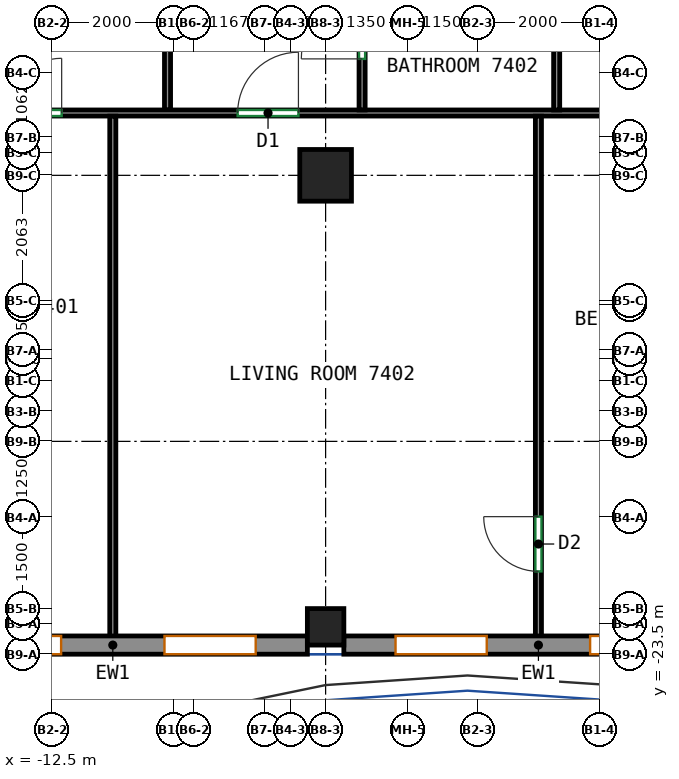
"""IFC4 building model, lengths in metres.
Left out: names, types, materials, properties, quantities, classifications, styles, units other than length and angle.
Written with IfcOpenShell. Run it as: python <this file> out.ifc"""

import sys

from ifc_helpers import new_model, si_unit, direction, frame, frame_2d, origin, origin_2d, place, context, subcontext, project, spatial, rectangle, extrude, source, transform, mapped, element, fill, save


model = new_model("IFC4")
c1 = context("Model", 3, precision=1e-05, world=origin(), true_north=direction((0.0, 1.0)))
c2 = subcontext(c1, "Body", "Model", "MODEL_VIEW")
j1 = project(units=[si_unit("LENGTHUNIT", "METRE"), si_unit("PLANEANGLEUNIT", "RADIAN")], contexts=[c1])
p1 = place(None, origin())
s1 = spatial("IfcSite", under=j1, at=p1, CompositionType="ELEMENT")
p2 = place(p1, origin())
s2 = spatial("IfcBuilding", under=s1, at=p2, CompositionType="ELEMENT")
p3 = place(p2, frame((0.0, 0.0, 298.4)))
s3 = spatial("IfcBuildingStorey", under=s2, at=p3, CompositionType="ELEMENT", Elevation=298.4)
m1 = source(origin(), c2, "Body", "SweptSolid", [
    extrude(rectangle(XDim=0.6, YDim=0.6, at=origin_2d()), origin(), (0.0, 0.0, 1.0), 3.12),
])
p4 = place(p3, frame((-8.0, -23.05, 0.0), z_axis=(0.0, 0.0, 1.0), x_axis=(1.0, 0.0, 0.0)))
e1 = element("IfcColumn", 1, at=p4, inside=s3, PredefinedType="COLUMN", context=c2, shape_type="MappedRepresentation", body=[
    mapped(m1, transform((0.0, 0.0, 0.0))),
])
m2 = source(origin(), c2, "Body", "SweptSolid", [
    extrude(rectangle(XDim=0.85, YDim=0.85, at=origin_2d()), origin(), (0.0, 0.0, 1.0), 3.12),
])
p5 = place(p3, frame((-8.0, -15.625, 0.0), z_axis=(0.0, 0.0, 1.0), x_axis=(1.0, 0.0, 0.0)))
e2 = element("IfcColumn", 2, at=p5, inside=s3, PredefinedType="COLUMN", context=c2, shape_type="MappedRepresentation", body=[
    mapped(m2, transform((0.0, 0.0, 0.0))),
])
m3 = source(origin(), c2, "Body", "SweptSolid", [
    extrude(rectangle(XDim=6.4, YDim=0.3, at=frame_2d((3.2, 0.0))), origin(), (0.0, 0.0, 1.0), 3.12),
])
p6 = place(p3, frame((-14.7, -23.35, 0.0), z_axis=(0.0, 0.0, 1.0), x_axis=(1.0, 0.0, 0.0)))
e3 = element("IfcWall", 3, at=p6, inside=s3, PredefinedType="SOLIDWALL", context=c2, shape_type="MappedRepresentation", body=[
    mapped(m3, transform((0.0, 0.0, 0.0))),
])
p7 = place(p6, frame((0.85, 0.0, 0.8)))
e4 = element("IfcOpeningElement", 4, at=p7, cuts=e3, PredefinedType="OPENING", context=c2, shape_type="SweptSolid", body=[
    extrude(rectangle(XDim=1.5, YDim=2.05, at=frame_2d((0.75, 1.025))), frame((0.0, 0.16, 0.0), z_axis=(0.0, -1.0, 0.0), x_axis=(1.0, 0.0, 0.0)), (0.0, 0.0, 1.0), 0.32),
])
p8 = place(p6, frame((4.05, 0.0, 0.8)))
e5 = element("IfcOpeningElement", 5, at=p8, cuts=e3, PredefinedType="OPENING", context=c2, shape_type="SweptSolid", body=[
    extrude(rectangle(XDim=1.5, YDim=2.05, at=frame_2d((0.75, 1.025))), frame((0.0, 0.16, 0.0), z_axis=(0.0, -1.0, 0.0), x_axis=(1.0, 0.0, 0.0)), (0.0, 0.0, 1.0), 0.32),
])
p9 = place(p3, frame((-7.7, -23.35, 0.0), z_axis=(0.0, 0.0, 1.0), x_axis=(1.0, 0.0, 0.0)))
e6 = element("IfcWall", 6, at=p9, inside=s3, PredefinedType="SOLIDWALL", context=c2, shape_type="MappedRepresentation", body=[
    mapped(m3, transform((0.0, 0.0, 0.0))),
])
p10 = place(p9, frame((0.85, 0.0, 0.8)))
e7 = element("IfcOpeningElement", 7, at=p10, cuts=e6, PredefinedType="OPENING", context=c2, shape_type="SweptSolid", body=[
    extrude(rectangle(XDim=1.5, YDim=2.05, at=frame_2d((0.75, 1.025))), frame((0.0, 0.16, 0.0), z_axis=(0.0, -1.0, 0.0), x_axis=(1.0, 0.0, 0.0)), (0.0, 0.0, 1.0), 0.32),
])
p11 = place(p9, frame((4.05, 0.0, 0.8)))
e8 = element("IfcOpeningElement", 8, at=p11, cuts=e6, PredefinedType="OPENING", context=c2, shape_type="SweptSolid", body=[
    extrude(rectangle(XDim=1.5, YDim=2.05, at=frame_2d((0.75, 1.025))), frame((0.0, 0.16, 0.0), z_axis=(0.0, -1.0, 0.0), x_axis=(1.0, 0.0, 0.0)), (0.0, 0.0, 1.0), 0.32),
])
p12 = place(p3, frame((-10.6, -14.55, 0.0), z_axis=(0.0, 0.0, 1.0), x_axis=(0.0, 1.0, 0.0)))
e9 = element("IfcWall", 9, at=p12, inside=s3, PredefinedType="PARTITIONING", context=c2, shape_type="SweptSolid", body=[
    extrude(rectangle(XDim=2.573, YDim=0.1, at=frame_2d((1.287, 0.0))), origin(), (0.0, 0.0, 1.0), 3.12),
])
p13 = place(p12, frame((1.373, 0.0, 0.0)))
e10 = element("IfcOpeningElement", 10, at=p13, cuts=e9, PredefinedType="OPENING", context=c2, shape_type="SweptSolid", body=[
    extrude(rectangle(XDim=1.0, YDim=2.1, at=frame_2d((0.5, 1.05))), frame((0.0, 0.06, 0.0), z_axis=(0.0, -1.0, 0.0), x_axis=(1.0, 0.0, 0.0)), (0.0, 0.0, 1.0), 0.12),
])
p14 = place(p3, frame((-13.55, -14.6, 0.0), z_axis=(0.0, 0.0, 1.0), x_axis=(1.0, 0.0, 0.0)))
e11 = element("IfcWall", 11, at=p14, inside=s3, PredefinedType="PARTITIONING", context=c2, shape_type="SweptSolid", body=[
    extrude(rectangle(XDim=31.3, YDim=0.1, at=frame_2d((15.65, 0.0))), origin(), (0.0, 0.0, 1.0), 3.12),
])
p15 = place(p14, frame((0.309, 0.0, 0.0)))
e12 = element("IfcOpeningElement", 12, at=p15, cuts=e11, PredefinedType="OPENING", context=c2, shape_type="SweptSolid", body=[
    extrude(rectangle(XDim=0.9, YDim=2.1, at=frame_2d((0.45, 1.05))), frame((0.0, 0.06, 0.0), z_axis=(0.0, -1.0, 0.0), x_axis=(1.0, 0.0, 0.0)), (0.0, 0.0, 1.0), 0.12),
])
p16 = place(p14, frame((4.103, 0.0, 0.0)))
e13 = element("IfcOpeningElement", 13, at=p16, cuts=e11, PredefinedType="OPENING", context=c2, shape_type="SweptSolid", body=[
    extrude(rectangle(XDim=1.0, YDim=2.1, at=frame_2d((0.5, 1.05))), frame((0.0, 0.06, 0.0), z_axis=(0.0, -1.0, 0.0), x_axis=(1.0, 0.0, 0.0)), (0.0, 0.0, 1.0), 0.12),
])
p17 = place(p14, frame((13.955, 0.0, 0.0)))
e14 = element("IfcOpeningElement", 14, at=p17, cuts=e11, PredefinedType="OPENING", context=c2, shape_type="SweptSolid", body=[
    extrude(rectangle(XDim=0.9, YDim=2.1, at=frame_2d((0.45, 1.05))), frame((0.0, 0.06, 0.0), z_axis=(0.0, -1.0, 0.0), x_axis=(1.0, 0.0, 0.0)), (0.0, 0.0, 1.0), 0.12),
])
p18 = place(p14, frame((17.453, 0.0, 0.0)))
e15 = element("IfcOpeningElement", 15, at=p18, cuts=e11, PredefinedType="OPENING", context=c2, shape_type="SweptSolid", body=[
    extrude(rectangle(XDim=1.0, YDim=2.1, at=frame_2d((0.5, 1.05))), frame((0.0, 0.06, 0.0), z_axis=(0.0, -1.0, 0.0), x_axis=(1.0, 0.0, 0.0)), (0.0, 0.0, 1.0), 0.12),
])
p19 = place(p14, frame((23.13, 0.0, 0.0)))
e16 = element("IfcOpeningElement", 16, at=p19, cuts=e11, PredefinedType="OPENING", context=c2, shape_type="SweptSolid", body=[
    extrude(rectangle(XDim=1.0, YDim=2.1, at=frame_2d((0.5, 1.05))), frame((0.0, 0.06, 0.0), z_axis=(0.0, -1.0, 0.0), x_axis=(1.0, 0.0, 0.0)), (0.0, 0.0, 1.0), 0.12),
])
p20 = place(p3, frame((-7.4, -14.55, 0.0), z_axis=(0.0, 0.0, 1.0), x_axis=(0.0, 1.0, 0.0)))
e17 = element("IfcWall", 17, at=p20, inside=s3, PredefinedType="PARTITIONING", context=c2, shape_type="SweptSolid", body=[
    extrude(rectangle(XDim=2.573, YDim=0.1, at=frame_2d((1.287, 0.0))), origin(), (0.0, 0.0, 1.0), 3.12),
])
p21 = place(p20, frame((0.84, 0.0, 0.0)))
e18 = element("IfcOpeningElement", 18, at=p21, cuts=e17, PredefinedType="OPENING", context=c2, shape_type="SweptSolid", body=[
    extrude(rectangle(XDim=1.0, YDim=2.1, at=frame_2d((0.5, 1.05))), frame((0.0, 0.06, 0.0), z_axis=(0.0, -1.0, 0.0), x_axis=(1.0, 0.0, 0.0)), (0.0, 0.0, 1.0), 0.12),
])
p22 = place(p3, frame((-4.2, -14.55, 0.0), z_axis=(0.0, 0.0, 1.0), x_axis=(0.0, 1.0, 0.0)))
e19 = element("IfcWall", 19, at=p22, inside=s3, PredefinedType="PARTITIONING", context=c2, shape_type="SweptSolid", body=[
    extrude(rectangle(XDim=2.573, YDim=0.1, at=frame_2d((1.287, 0.0))), origin(), (0.0, 0.0, 1.0), 3.12),
])
p23 = place(p22, frame((1.261, 0.0, 0.0)))
e20 = element("IfcOpeningElement", 20, at=p23, cuts=e19, PredefinedType="OPENING", context=c2, shape_type="SweptSolid", body=[
    extrude(rectangle(XDim=0.9, YDim=2.1, at=frame_2d((0.45, 1.05))), frame((0.0, 0.06, 0.0), z_axis=(0.0, -1.0, 0.0), x_axis=(1.0, 0.0, 0.0)), (0.0, 0.0, 1.0), 0.12),
])
p24 = place(p3, frame((-11.5, -23.25, 0.0), z_axis=(0.0, 0.0, 1.0), x_axis=(0.0, 1.0, 0.0)))
e21 = element("IfcWall", 21, at=p24, inside=s3, PredefinedType="PARTITIONING", context=c2, shape_type="SweptSolid", body=[
    extrude(rectangle(XDim=8.598, YDim=0.1, at=frame_2d((4.299, 0.0))), origin(), (0.0, 0.0, 1.0), 3.12),
])
p25 = place(p3, frame((-4.5, -23.25, 0.0), z_axis=(0.0, 0.0, 1.0), x_axis=(0.0, 1.0, 0.0)))
e22 = element("IfcWall", 22, at=p25, inside=s3, PredefinedType="PARTITIONING", context=c2, shape_type="SweptSolid", body=[
    extrude(rectangle(XDim=8.598, YDim=0.1, at=frame_2d((4.299, 0.0))), origin(), (0.0, 0.0, 1.0), 3.12),
])
p26 = place(p25, frame((1.112, 0.0, 0.0)))
e23 = element("IfcOpeningElement", 23, at=p26, cuts=e22, PredefinedType="OPENING", context=c2, shape_type="SweptSolid", body=[
    extrude(rectangle(XDim=0.9, YDim=2.1, at=frame_2d((0.45, 1.05))), frame((0.0, 0.06, 0.0), z_axis=(0.0, -1.0, 0.0), x_axis=(1.0, 0.0, 0.0)), (0.0, 0.0, 1.0), 0.12),
])
p27 = place(p7, origin())
e24 = element("IfcWindow", 24, at=p27, inside=s3, PartitioningType="SINGLE_PANEL", PredefinedType="WINDOW", context=c2, shape_type="SweptSolid", body=[
    extrude(rectangle(XDim=1.5, YDim=2.05, at=frame_2d((0.75, 1.025))), frame((0.0, 0.03, 0.0), z_axis=(0.0, -1.0, 0.0), x_axis=(1.0, 0.0, 0.0)), (0.0, 0.0, 1.0), 0.06),
])
fill(e4, e24)
p28 = place(p8, origin())
e25 = element("IfcWindow", 25, at=p28, inside=s3, PartitioningType="SINGLE_PANEL", PredefinedType="WINDOW", context=c2, shape_type="SweptSolid", body=[
    extrude(rectangle(XDim=1.5, YDim=2.05, at=frame_2d((0.75, 1.025))), frame((0.0, 0.03, 0.0), z_axis=(0.0, -1.0, 0.0), x_axis=(1.0, 0.0, 0.0)), (0.0, 0.0, 1.0), 0.06),
])
fill(e5, e25)
p29 = place(p10, origin())
e26 = element("IfcWindow", 26, at=p29, inside=s3, PartitioningType="SINGLE_PANEL", PredefinedType="WINDOW", context=c2, shape_type="SweptSolid", body=[
    extrude(rectangle(XDim=1.5, YDim=2.05, at=frame_2d((0.75, 1.025))), frame((0.0, 0.03, 0.0), z_axis=(0.0, -1.0, 0.0), x_axis=(1.0, 0.0, 0.0)), (0.0, 0.0, 1.0), 0.06),
])
fill(e7, e26)
p30 = place(p11, origin())
e27 = element("IfcWindow", 27, at=p30, inside=s3, PartitioningType="SINGLE_PANEL", PredefinedType="WINDOW", context=c2, shape_type="SweptSolid", body=[
    extrude(rectangle(XDim=1.5, YDim=2.05, at=frame_2d((0.75, 1.025))), frame((0.0, 0.03, 0.0), z_axis=(0.0, -1.0, 0.0), x_axis=(1.0, 0.0, 0.0)), (0.0, 0.0, 1.0), 0.06),
])
fill(e8, e27)
p31 = place(p26, origin())
e28 = element("IfcDoor", 28, at=p31, inside=s3, OperationType="SINGLE_SWING_RIGHT", PredefinedType="DOOR", context=c2, shape_type="SweptSolid", body=[
    extrude(rectangle(XDim=0.9, YDim=2.1, at=frame_2d((0.45, 1.05))), frame((0.0, 0.025, 0.0), z_axis=(0.0, -1.0, 0.0), x_axis=(1.0, 0.0, 0.0)), (0.0, 0.0, 1.0), 0.05),
])
fill(e23, e28)
p32 = place(p15, origin())
e29 = element("IfcDoor", 29, at=p32, inside=s3, OperationType="SINGLE_SWING_RIGHT", PredefinedType="DOOR", context=c2, shape_type="SweptSolid", body=[
    extrude(rectangle(XDim=0.9, YDim=2.1, at=frame_2d((0.45, 1.05))), frame((0.0, 0.025, 0.0), z_axis=(0.0, -1.0, 0.0), x_axis=(1.0, 0.0, 0.0)), (0.0, 0.0, 1.0), 0.05),
])
fill(e12, e29)
p33 = place(p16, origin())
e30 = element("IfcDoor", 30, at=p33, inside=s3, OperationType="SINGLE_SWING_RIGHT", PredefinedType="DOOR", context=c2, shape_type="SweptSolid", body=[
    extrude(rectangle(XDim=1.0, YDim=2.1, at=frame_2d((0.5, 1.05))), frame((0.0, 0.025, 0.0), z_axis=(0.0, -1.0, 0.0), x_axis=(1.0, 0.0, 0.0)), (0.0, 0.0, 1.0), 0.05),
])
fill(e13, e30)
p34 = place(p21, origin())
e31 = element("IfcDoor", 31, at=p34, inside=s3, OperationType="SINGLE_SWING_LEFT", PredefinedType="DOOR", context=c2, shape_type="SweptSolid", body=[
    extrude(rectangle(XDim=1.0, YDim=2.1, at=frame_2d((0.5, 1.05))), frame((0.0, 0.025, 0.0), z_axis=(0.0, -1.0, 0.0), x_axis=(1.0, 0.0, 0.0)), (0.0, 0.0, 1.0), 0.05),
])
fill(e18, e31)
save(model, sys.argv[1])
